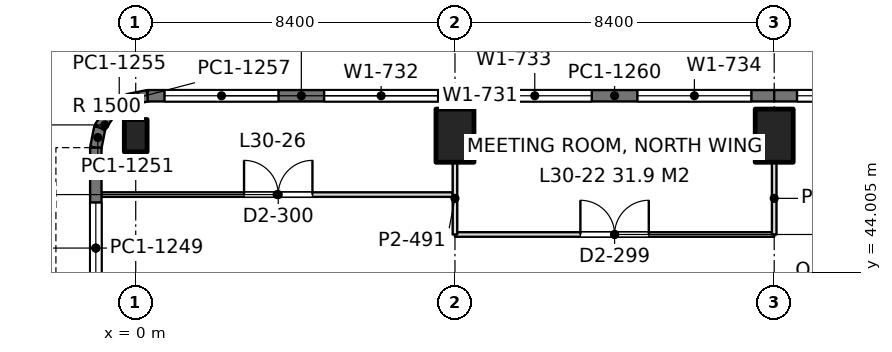
"""IFC4 building model, lengths in metres.
Left out: names, types, materials, properties, quantities, classifications, styles, units other than length and angle.
Written with IfcOpenShell. Run it as: python <this file> out.ifc"""

import sys

from ifc_helpers import new_model, si_unit, direction, frame, frame_2d, origin, origin_2d, place, context, subcontext, project, spatial, rectangle, extrude, element, fill, save


model = new_model("IFC4")
c1 = context("Model", 3, precision=1e-05, world=origin(), true_north=direction((0.0, 1.0)))
c2 = subcontext(c1, "Body", "Model", "MODEL_VIEW")
j1 = project(units=[si_unit("LENGTHUNIT", "METRE"), si_unit("PLANEANGLEUNIT", "RADIAN")], contexts=[c1])
p1 = place(None, origin())
s1 = spatial("IfcSite", under=j1, at=p1, CompositionType="ELEMENT")
p2 = place(p1, origin())
s2 = spatial("IfcBuilding", under=s1, at=p2, CompositionType="ELEMENT")
p3 = place(p2, frame((0.0, 0.0, 134.4)))
s3 = spatial("IfcBuildingStorey", under=s2, at=p3, CompositionType="ELEMENT", Elevation=134.4)
p4 = place(p3, frame((0.0, 47.6, 0.0), z_axis=(0.0, 0.0, 1.0), x_axis=(1.0, 0.0, 0.0)))
e1 = element("IfcColumn", 1, at=p4, inside=s3, PredefinedType="COLUMN", context=c2, shape_type="SweptSolid", body=[
    extrude(rectangle(XDim=0.6, YDim=0.85, at=origin_2d()), origin(), (0.0, 0.0, 1.0), 4.2),
])
for number, where, z_axis, x_axis in (
    (2, (8.4, 47.6, 0.0), (0.0, 0.0, 1.0), (1.0, 0.0, 0.0)),
    (3, (16.8, 47.6, 0.0), (0.0, 0.0, 1.0), (1.0, 0.0, 0.0)),
):
    element("IfcColumn", number, at=place(p3, frame(where, z_axis=z_axis, x_axis=x_axis)), inside=s3, PredefinedType="COLUMN", context=c2, shape_type="SweptSolid", body=[
        extrude(rectangle(XDim=1.0, YDim=1.4, at=origin_2d()), origin(), (0.0, 0.0, 1.0), 4.2),
    ])
p5 = place(p3, frame((-1.05, 42.0, 0.0), z_axis=(0.0, 0.0, 1.0), x_axis=(0.0, 1.0, 0.0)))
e4 = element("IfcWall", 4, at=p5, inside=s3, PredefinedType="SOLIDWALL", context=c2, shape_type="SweptSolid", body=[
    extrude(rectangle(XDim=5.285, YDim=0.3, at=frame_2d((2.643, 0.0))), origin(), (0.0, 0.0, 1.0), 4.05),
])
p6 = place(p5, frame((1.443, 0.0, 0.9)))
e5 = element("IfcOpeningElement", 5, at=p6, cuts=e4, PredefinedType="OPENING", context=c2, shape_type="SweptSolid", body=[
    extrude(rectangle(XDim=2.4, YDim=1.9, at=frame_2d((1.2, 0.95))), frame((0.0, 0.16, 0.0), z_axis=(0.0, -1.0, 0.0), x_axis=(1.0, 0.0, 0.0)), (0.0, 0.0, 1.0), 0.32),
])
p7 = place(p3, frame((-1.05, 47.285, 0.0), z_axis=(0.0, 0.0, 1.0), x_axis=(0.195073962632, 0.980788534345, 0.0)))
e6 = element("IfcWall", 6, at=p7, inside=s3, PredefinedType="SOLIDWALL", context=c2, shape_type="SweptSolid", body=[
    extrude(rectangle(XDim=0.541, YDim=0.3, at=frame_2d((0.271, 0.0))), origin(), (0.0, 0.0, 1.0), 4.05),
])
p8 = place(p3, frame((-0.945, 47.815, 0.0), z_axis=(0.0, 0.0, 1.0), x_axis=(0.55534295404, 0.831621430339, 0.0)))
e7 = element("IfcWall", 7, at=p8, inside=s3, PredefinedType="SOLIDWALL", context=c2, shape_type="SweptSolid", body=[
    extrude(rectangle(XDim=0.526, YDim=0.3, at=frame_2d((0.263, 0.0))), origin(), (0.0, 0.0, 1.0), 4.05),
])
p9 = place(p3, frame((-0.653, 48.253, 0.0), z_axis=(0.0, 0.0, 1.0), x_axis=(0.831692711774, 0.555236195849, 0.0)))
e8 = element("IfcWall", 8, at=p9, inside=s3, PredefinedType="SOLIDWALL", context=c2, shape_type="SweptSolid", body=[
    extrude(rectangle(XDim=0.525, YDim=0.3, at=frame_2d((0.263, 0.0))), origin(), (0.0, 0.0, 1.0), 4.05),
])
p10 = place(p3, frame((-0.216, 48.544, 0.0), z_axis=(0.0, 0.0, 1.0), x_axis=(0.980788534345, 0.195073962632, 0.0)))
e9 = element("IfcWall", 9, at=p10, inside=s3, PredefinedType="SOLIDWALL", context=c2, shape_type="SweptSolid", body=[
    extrude(rectangle(XDim=0.541, YDim=0.3, at=frame_2d((0.271, 0.0))), origin(), (0.0, 0.0, 1.0), 4.05),
])
p11 = place(p3, frame((0.315, 48.65, 0.0), z_axis=(0.0, 0.0, 1.0), x_axis=(1.0, 0.0, 0.0)))
e10 = element("IfcWall", 10, at=p11, inside=s3, PredefinedType="SOLIDWALL", context=c2, shape_type="SweptSolid", body=[
    extrude(rectangle(XDim=8.085, YDim=0.3, at=frame_2d((4.042, 0.0))), origin(), (0.0, 0.0, 1.0), 4.05),
])
p12 = place(p11, frame((0.443, 0.0, 0.9)))
e11 = element("IfcOpeningElement", 11, at=p12, cuts=e10, PredefinedType="OPENING", context=c2, shape_type="SweptSolid", body=[
    extrude(rectangle(XDim=3.0, YDim=1.9, at=frame_2d((1.5, 0.95))), frame((0.0, 0.16, 0.0), z_axis=(0.0, -1.0, 0.0), x_axis=(1.0, 0.0, 0.0)), (0.0, 0.0, 1.0), 0.32),
])
p13 = place(p11, frame((4.643, 0.0, 0.9)))
e12 = element("IfcOpeningElement", 12, at=p13, cuts=e10, PredefinedType="OPENING", context=c2, shape_type="SweptSolid", body=[
    extrude(rectangle(XDim=3.0, YDim=1.9, at=frame_2d((1.5, 0.95))), frame((0.0, 0.16, 0.0), z_axis=(0.0, -1.0, 0.0), x_axis=(1.0, 0.0, 0.0)), (0.0, 0.0, 1.0), 0.32),
])
p14 = place(p3, frame((8.4, 48.65, 0.0), z_axis=(0.0, 0.0, 1.0), x_axis=(1.0, 0.0, 0.0)))
e13 = element("IfcWall", 13, at=p14, inside=s3, PredefinedType="SOLIDWALL", context=c2, shape_type="SweptSolid", body=[
    extrude(rectangle(XDim=8.4, YDim=0.3, at=frame_2d((4.2, 0.0))), origin(), (0.0, 0.0, 1.0), 4.05),
])
p15 = place(p14, frame((0.6, 0.0, 0.9)))
e14 = element("IfcOpeningElement", 14, at=p15, cuts=e13, PredefinedType="OPENING", context=c2, shape_type="SweptSolid", body=[
    extrude(rectangle(XDim=3.0, YDim=1.9, at=frame_2d((1.5, 0.95))), frame((0.0, 0.16, 0.0), z_axis=(0.0, -1.0, 0.0), x_axis=(1.0, 0.0, 0.0)), (0.0, 0.0, 1.0), 0.32),
])
p16 = place(p14, frame((4.8, 0.0, 0.9)))
e15 = element("IfcOpeningElement", 15, at=p16, cuts=e13, PredefinedType="OPENING", context=c2, shape_type="SweptSolid", body=[
    extrude(rectangle(XDim=3.0, YDim=1.9, at=frame_2d((1.5, 0.95))), frame((0.0, 0.16, 0.0), z_axis=(0.0, -1.0, 0.0), x_axis=(1.0, 0.0, 0.0)), (0.0, 0.0, 1.0), 0.32),
])
p17 = place(p3, frame((16.8, 48.65, 0.0), z_axis=(0.0, 0.0, 1.0), x_axis=(1.0, 0.0, 0.0)))
e16 = element("IfcWall", 16, at=p17, inside=s3, PredefinedType="SOLIDWALL", context=c2, shape_type="SweptSolid", body=[
    extrude(rectangle(XDim=8.4, YDim=0.3, at=frame_2d((4.2, 0.0))), origin(), (0.0, 0.0, 1.0), 4.05),
])
p18 = place(p17, frame((0.6, 0.0, 0.9)))
e17 = element("IfcOpeningElement", 17, at=p18, cuts=e16, PredefinedType="OPENING", context=c2, shape_type="SweptSolid", body=[
    extrude(rectangle(XDim=3.0, YDim=1.9, at=frame_2d((1.5, 0.95))), frame((0.0, 0.16, 0.0), z_axis=(0.0, -1.0, 0.0), x_axis=(1.0, 0.0, 0.0)), (0.0, 0.0, 1.0), 0.32),
])
p19 = place(p17, frame((4.8, 0.0, 0.9)))
e18 = element("IfcOpeningElement", 18, at=p19, cuts=e16, PredefinedType="OPENING", context=c2, shape_type="SweptSolid", body=[
    extrude(rectangle(XDim=3.0, YDim=1.9, at=frame_2d((1.5, 0.95))), frame((0.0, 0.16, 0.0), z_axis=(0.0, -1.0, 0.0), x_axis=(1.0, 0.0, 0.0)), (0.0, 0.0, 1.0), 0.32),
])
p20 = place(p3, frame((-0.902, 46.05, 0.0), z_axis=(0.0, 0.0, 1.0), x_axis=(1.0, 0.0, 0.0)))
e19 = element("IfcWall", 19, at=p20, inside=s3, PredefinedType="PARTITIONING", context=c2, shape_type="SweptSolid", body=[
    extrude(rectangle(XDim=9.244, YDim=0.12, at=frame_2d((4.622, 0.0))), origin(), (0.0, 0.0, 1.0), 3.55),
])
p21 = place(p20, frame((3.752, 0.0, 0.0)))
e20 = element("IfcOpeningElement", 20, at=p21, cuts=e19, PredefinedType="OPENING", context=c2, shape_type="SweptSolid", body=[
    extrude(rectangle(XDim=1.8, YDim=2.2, at=frame_2d((0.9, 1.1))), frame((0.0, 0.07, 0.0), z_axis=(0.0, -1.0, 0.0), x_axis=(1.0, 0.0, 0.0)), (0.0, 0.0, 1.0), 0.14),
])
p22 = place(p3, frame((8.4, 45.0, 0.0), z_axis=(0.0, 0.0, 1.0), x_axis=(1.0, 0.0, 0.0)))
e21 = element("IfcWall", 21, at=p22, inside=s3, PredefinedType="PARTITIONING", context=c2, shape_type="SweptSolid", body=[
    extrude(rectangle(XDim=8.4, YDim=0.12, at=frame_2d((4.2, 0.0))), origin(), (0.0, 0.0, 1.0), 3.55),
])
p23 = place(p22, frame((3.3, 0.0, 0.0)))
e22 = element("IfcOpeningElement", 22, at=p23, cuts=e21, PredefinedType="OPENING", context=c2, shape_type="SweptSolid", body=[
    extrude(rectangle(XDim=1.8, YDim=2.2, at=frame_2d((0.9, 1.1))), frame((0.0, 0.07, 0.0), z_axis=(0.0, -1.0, 0.0), x_axis=(1.0, 0.0, 0.0)), (0.0, 0.0, 1.0), 0.14),
])
for number, where, z_axis, x_axis in (
    (23, (8.4, 45.0, 0.0), (0.0, 0.0, 1.0), (0.0, 1.0, 0.0)),
    (24, (16.8, 45.0, 0.0), (0.0, 0.0, 1.0), (0.0, 1.0, 0.0)),
):
    element("IfcWall", number, at=place(p3, frame(where, z_axis=z_axis, x_axis=x_axis)), inside=s3, PredefinedType="PARTITIONING", context=c2, shape_type="SweptSolid", body=[
        extrude(rectangle(XDim=1.901, YDim=0.12, at=frame_2d((0.95, 0.0))), origin(), (0.0, 0.0, 1.0), 3.55),
    ])
p24 = place(p6, origin())
e25 = element("IfcWindow", 25, at=p24, inside=s3, PartitioningType="SINGLE_PANEL", PredefinedType="WINDOW", context=c2, shape_type="SweptSolid", body=[
    extrude(rectangle(XDim=2.4, YDim=1.9, at=frame_2d((1.2, 0.95))), frame((0.0, 0.03, 0.0), z_axis=(0.0, -1.0, 0.0), x_axis=(1.0, 0.0, 0.0)), (0.0, 0.0, 1.0), 0.06),
])
fill(e5, e25)
p25 = place(p12, origin())
e26 = element("IfcWindow", 26, at=p25, inside=s3, PartitioningType="SINGLE_PANEL", PredefinedType="WINDOW", context=c2, shape_type="SweptSolid", body=[
    extrude(rectangle(XDim=3.0, YDim=1.9, at=frame_2d((1.5, 0.95))), frame((0.0, 0.03, 0.0), z_axis=(0.0, -1.0, 0.0), x_axis=(1.0, 0.0, 0.0)), (0.0, 0.0, 1.0), 0.06),
])
fill(e11, e26)
p26 = place(p13, origin())
e27 = element("IfcWindow", 27, at=p26, inside=s3, PartitioningType="SINGLE_PANEL", PredefinedType="WINDOW", context=c2, shape_type="SweptSolid", body=[
    extrude(rectangle(XDim=3.0, YDim=1.9, at=frame_2d((1.5, 0.95))), frame((0.0, 0.03, 0.0), z_axis=(0.0, -1.0, 0.0), x_axis=(1.0, 0.0, 0.0)), (0.0, 0.0, 1.0), 0.06),
])
fill(e12, e27)
p27 = place(p15, origin())
e28 = element("IfcWindow", 28, at=p27, inside=s3, PartitioningType="SINGLE_PANEL", PredefinedType="WINDOW", context=c2, shape_type="SweptSolid", body=[
    extrude(rectangle(XDim=3.0, YDim=1.9, at=frame_2d((1.5, 0.95))), frame((0.0, 0.03, 0.0), z_axis=(0.0, -1.0, 0.0), x_axis=(1.0, 0.0, 0.0)), (0.0, 0.0, 1.0), 0.06),
])
fill(e14, e28)
p28 = place(p16, origin())
e29 = element("IfcWindow", 29, at=p28, inside=s3, PartitioningType="SINGLE_PANEL", PredefinedType="WINDOW", context=c2, shape_type="SweptSolid", body=[
    extrude(rectangle(XDim=3.0, YDim=1.9, at=frame_2d((1.5, 0.95))), frame((0.0, 0.03, 0.0), z_axis=(0.0, -1.0, 0.0), x_axis=(1.0, 0.0, 0.0)), (0.0, 0.0, 1.0), 0.06),
])
fill(e15, e29)
p29 = place(p18, origin())
e30 = element("IfcWindow", 30, at=p29, inside=s3, PartitioningType="SINGLE_PANEL", PredefinedType="WINDOW", context=c2, shape_type="SweptSolid", body=[
    extrude(rectangle(XDim=3.0, YDim=1.9, at=frame_2d((1.5, 0.95))), frame((0.0, 0.03, 0.0), z_axis=(0.0, -1.0, 0.0), x_axis=(1.0, 0.0, 0.0)), (0.0, 0.0, 1.0), 0.06),
])
fill(e17, e30)
p30 = place(p21, origin())
e31 = element("IfcDoor", 31, at=p30, inside=s3, OperationType="DOUBLE_DOOR_SINGLE_SWING", PredefinedType="DOOR", context=c2, shape_type="SweptSolid", body=[
    extrude(rectangle(XDim=1.8, YDim=2.2, at=frame_2d((0.9, 1.1))), frame((0.0, 0.025, 0.0), z_axis=(0.0, -1.0, 0.0), x_axis=(1.0, 0.0, 0.0)), (0.0, 0.0, 1.0), 0.05),
])
fill(e20, e31)
p31 = place(p23, origin())
e32 = element("IfcDoor", 32, at=p31, inside=s3, OperationType="DOUBLE_DOOR_SINGLE_SWING", PredefinedType="DOOR", context=c2, shape_type="SweptSolid", body=[
    extrude(rectangle(XDim=1.8, YDim=2.2, at=frame_2d((0.9, 1.1))), frame((0.0, 0.025, 0.0), z_axis=(0.0, -1.0, 0.0), x_axis=(1.0, 0.0, 0.0)), (0.0, 0.0, 1.0), 0.05),
])
fill(e22, e32)
save(model, sys.argv[1])
